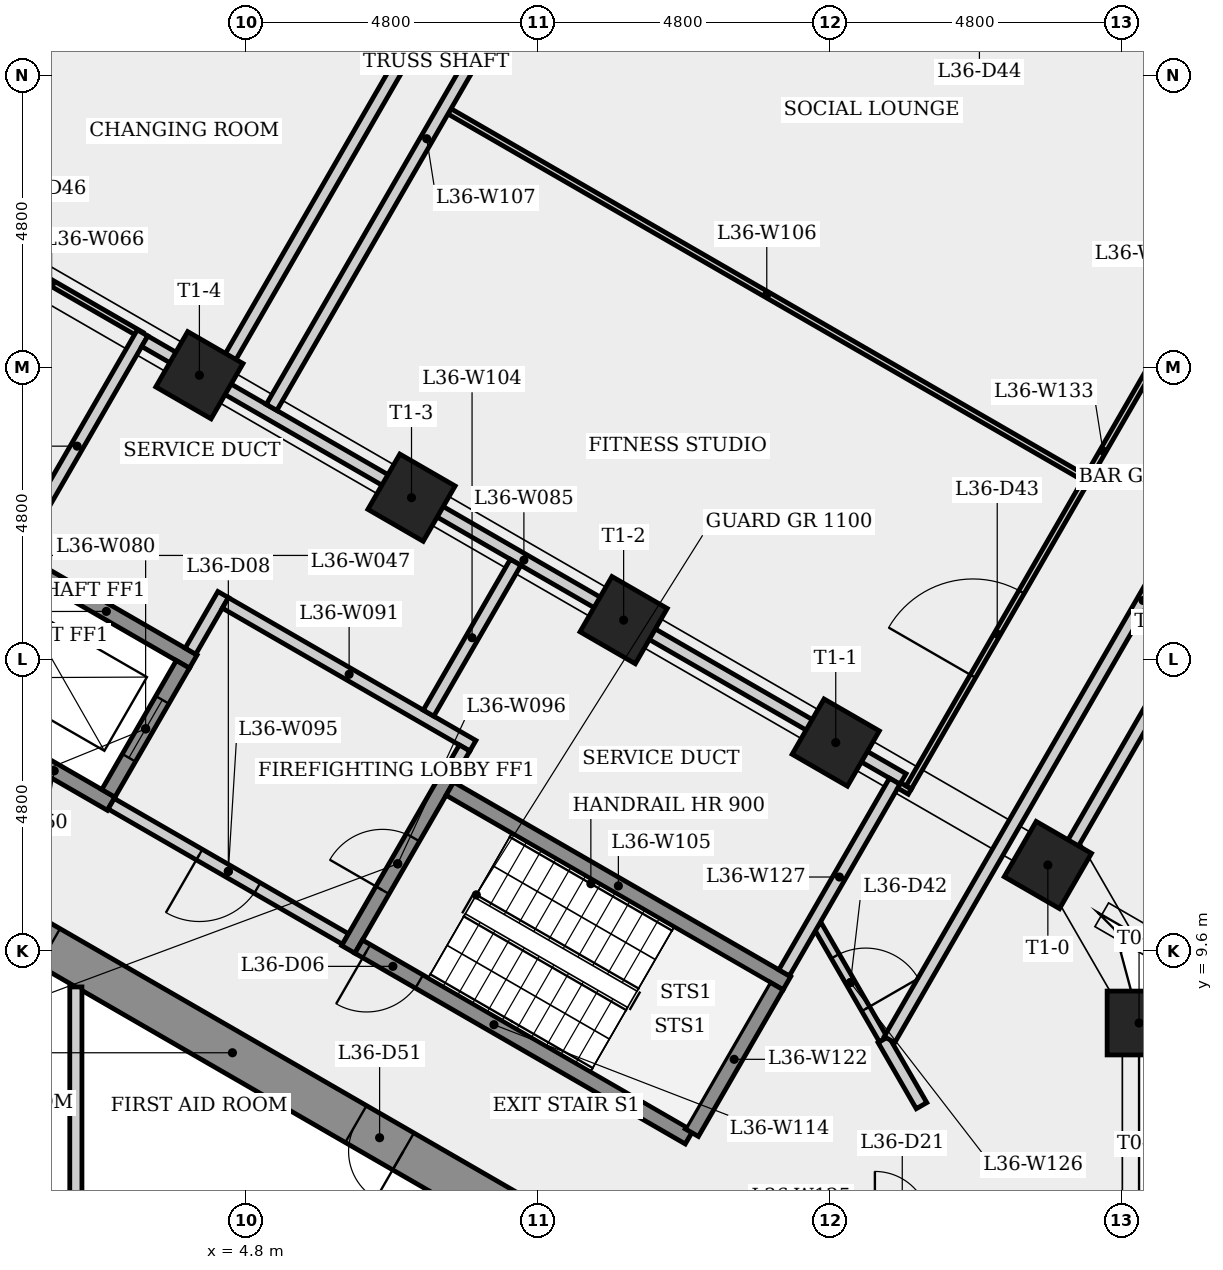
"""IFC4 building model, lengths in metres.
Left out: names, types, materials, properties, quantities, classifications, styles, units other than length and angle.
Written with IfcOpenShell. Run it as: python <this file> out.ifc"""

import sys

from ifc_helpers import new_model, si_unit, direction, frame, frame_2d, origin, origin_2d, place, context, subcontext, project, spatial, rectangle, extrude, element, fill, save


model = new_model("IFC4")
c1 = context("Model", 3, precision=1e-05, world=origin(), true_north=direction((0.0, 1.0)))
c2 = subcontext(c1, "Body", "Model", "MODEL_VIEW")
j1 = project(units=[si_unit("LENGTHUNIT", "METRE"), si_unit("PLANEANGLEUNIT", "RADIAN")], contexts=[c1])
p1 = place(None, origin())
s1 = spatial("IfcSite", under=j1, at=p1, CompositionType="ELEMENT")
p2 = place(p1, origin())
s2 = spatial("IfcBuilding", under=s1, at=p2, CompositionType="ELEMENT")
p3 = place(p2, frame((0.0, 0.0, 135.9)))
s3 = spatial("IfcBuildingStorey", under=s2, at=p3, CompositionType="ELEMENT", Elevation=135.9)
p4 = place(p3, frame((9.325, 5.182, 0.0), z_axis=(0.0, 0.0, 1.0), x_axis=(-0.866023993627, 0.500002442456, 0.0)))
e1 = element("IfcWall", 1, at=p4, inside=s3, PredefinedType="SHEAR", context=c2, shape_type="SweptSolid", body=[
    extrude(rectangle(XDim=10.97, YDim=0.7, at=frame_2d((5.485, 0.0))), origin(), (0.0, 0.0, 1.0), 4.0),
])
p5 = place(p4, frame((8.96, 0.0, 0.0)))
e2 = element("IfcOpeningElement", 2, at=p5, cuts=e1, PredefinedType="OPENING", context=c2, shape_type="SweptSolid", body=[
    extrude(rectangle(XDim=0.9, YDim=2.1, at=frame_2d((0.45, 1.05))), frame((0.0, 0.36, 0.0), z_axis=(0.0, -1.0, 0.0), x_axis=(1.0, 0.0, 0.0)), (0.0, 0.0, 1.0), 0.72),
])
p6 = place(p4, frame((2.24, 0.0, 0.0)))
e3 = element("IfcOpeningElement", 3, at=p6, cuts=e1, PredefinedType="OPENING", context=c2, shape_type="SweptSolid", body=[
    extrude(rectangle(XDim=0.9, YDim=2.1, at=frame_2d((0.45, 1.05))), frame((0.0, 0.36, 0.0), z_axis=(0.0, -1.0, 0.0), x_axis=(1.0, 0.0, 0.0)), (0.0, 0.0, 1.0), 0.72),
])
for number, where, z_axis, x_axis in (
    (4, (19.486, 8.413, 0.0), (0.0, 0.0, 1.0), (1.0, 0.0, 0.0)),
    (5, (17.986, 11.011, 0.0), (0.0, 0.0, 1.0), (0.5, 0.866, 0.0)),
    (6, (14.497, 13.026, 0.0), (0.0, 0.0, 1.0), (0.5, 0.866, 0.0)),
    (7, (11.009, 15.04, 0.0), (0.0, 0.0, 1.0), (0.5, 0.866, 0.0)),
    (8, (7.52, 17.054, 0.0), (0.0, 0.0, 1.0), (0.5, 0.866, 0.0)),
    (9, (4.032, 19.068, 0.0), (0.0, 0.0, 1.0), (0.5, 0.866, 0.0)),
):
    element("IfcColumn", number, at=place(p3, frame(where, z_axis=z_axis, x_axis=x_axis)), inside=s3, PredefinedType="COLUMN", context=c2, shape_type="SweptSolid", body=[
        extrude(rectangle(XDim=1.05, YDim=1.05, at=origin_2d()), origin(), (0.0, 0.0, 1.0), 4.0),
    ])
p7 = place(p3, frame((-2.642, 21.926, 0.0), z_axis=(0.0, 0.0, 1.0), x_axis=(0.391327561496, 0.920251454557, 0.0)))
e10 = element("IfcWall", 10, at=p7, inside=s3, PredefinedType="PLUMBINGWALL", context=c2, shape_type="SweptSolid", body=[
    extrude(rectangle(XDim=13.856, YDim=0.2, at=frame_2d((6.928, 0.0))), origin(), (0.0, 0.0, 1.0), 3.6),
])
p8 = place(p3, frame((0.124, 21.436, 0.0), z_axis=(0.0, 0.0, 1.0), x_axis=(0.866036589769, -0.499980624807, 0.0)))
e11 = element("IfcWall", 11, at=p8, inside=s3, PredefinedType="PARTITIONING", context=c2, shape_type="SweptSolid", body=[
    extrude(rectangle(XDim=3.411, YDim=0.1, at=frame_2d((1.706, 0.0))), origin(), (0.0, 0.0, 1.0), 2.725),
])
p9 = place(p3, frame((1.073, 16.008, 0.0), z_axis=(0.0, 0.0, 1.0), x_axis=(0.866040211805, -0.499974350878, 0.0)))
e12 = element("IfcWall", 12, at=p9, inside=s3, PredefinedType="SHEAR", context=c2, shape_type="SweptSolid", body=[
    extrude(rectangle(XDim=3.3, YDim=0.25, at=frame_2d((1.65, 0.0))), origin(), (0.0, 0.0, 1.0), 3.6),
])
p10 = place(p3, frame((0.946, 16.039, 0.0), z_axis=(0.0, 0.0, 1.0), x_axis=(0.50004020135, 0.86600219228, 0.0)))
e13 = element("IfcWall", 13, at=p10, inside=s3, PredefinedType="PLUMBINGWALL", context=c2, shape_type="SweptSolid", body=[
    extrude(rectangle(XDim=4.301, YDim=0.2, at=frame_2d((2.15, 0.0))), origin(), (0.0, 0.0, 1.0), 3.6),
])
p11 = place(p3, frame((2.0, 9.007, 0.0), z_axis=(0.0, 0.0, 1.0), x_axis=(0.0, -1.0, 0.0)))
e14 = element("IfcWall", 14, at=p11, inside=s3, PredefinedType="PARTITIONING", context=c2, shape_type="SweptSolid", body=[
    extrude(rectangle(XDim=3.732, YDim=0.2, at=frame_2d((1.866, 0.0))), origin(), (0.0, 0.0, 1.0), 3.6),
])
p12 = place(p3, frame((2.581, 12.02, 0.0), z_axis=(0.0, 0.0, 1.0), x_axis=(-0.86603892542, 0.499976579108, 0.0)))
e15 = element("IfcWall", 15, at=p12, inside=s3, PredefinedType="SHEAR", context=c2, shape_type="SweptSolid", body=[
    extrude(rectangle(XDim=2.162, YDim=0.25, at=frame_2d((1.081, 0.0))), origin(), (0.0, 0.0, 1.0), 3.6),
])
p13 = place(p3, frame((2.535, 12.191, 0.0), z_axis=(0.0, 0.0, 1.0), x_axis=(0.500061746146, 0.865989751695, 0.0)))
e16 = element("IfcWall", 16, at=p13, inside=s3, PredefinedType="SHEAR", context=c2, shape_type="SweptSolid", body=[
    extrude(rectangle(XDim=2.45, YDim=0.25, at=frame_2d((1.225, 0.0))), origin(), (0.0, 0.0, 1.0), 4.0),
])
p14 = place(p13, frame((0.675, 0.0, 0.0)))
e17 = element("IfcOpeningElement", 17, at=p14, cuts=e16, PredefinedType="OPENING", context=c2, shape_type="SweptSolid", body=[
    extrude(rectangle(XDim=1.1, YDim=2.1, at=frame_2d((0.55, 1.05))), frame((0.0, 0.135, 0.0), z_axis=(0.0, -1.0, 0.0), x_axis=(1.0, 0.0, 0.0)), (0.0, 0.0, 1.0), 0.27),
])
p15 = place(p3, frame((0.187, 21.457, 0.0), z_axis=(0.0, 0.0, 1.0), x_axis=(0.391326404729, 0.920251946459, 0.0)))
e18 = element("IfcWall", 18, at=p15, inside=s3, PredefinedType="PARTITIONING", context=c2, shape_type="SweptSolid", body=[
    extrude(rectangle(XDim=12.69, YDim=0.1, at=frame_2d((6.345, 0.0))), origin(), (0.0, 0.0, 1.0), 3.6),
])
p16 = place(p15, frame((2.857, 0.0, 0.0)))
e19 = element("IfcOpeningElement", 19, at=p16, cuts=e18, PredefinedType="OPENING", context=c2, shape_type="SweptSolid", body=[
    extrude(rectangle(XDim=0.9, YDim=2.1, at=frame_2d((0.45, 1.05))), frame((0.0, 0.06, 0.0), z_axis=(0.0, -1.0, 0.0), x_axis=(1.0, 0.0, 0.0)), (0.0, 0.0, 1.0), 0.12),
])
p17 = place(p3, frame((3.133, 19.627, 0.0), z_axis=(0.0, 0.0, 1.0), x_axis=(0.866025783705, -0.499999341958, 0.0)))
e20 = element("IfcWall", 20, at=p17, inside=s3, PredefinedType="PLUMBINGWALL", context=c2, shape_type="SweptSolid", body=[
    extrude(rectangle(XDim=14.4, YDim=0.2, at=frame_2d((7.2, 0.0))), origin(), (0.0, 0.0, 1.0), 2.725),
])
p18 = place(p3, frame((3.574, 33.989, 0.0), z_axis=(0.0, 0.0, 1.0), x_axis=(-0.391321327566, -0.920254105447, 0.0)))
e21 = element("IfcWall", 21, at=p18, inside=s3, PredefinedType="PLUMBINGWALL", context=c2, shape_type="SweptSolid", body=[
    extrude(rectangle(XDim=12.903, YDim=0.2, at=frame_2d((6.452, 0.0))), origin(), (0.0, 0.0, 1.0), 3.6),
])
p19 = place(p3, frame((3.885, 14.529, 0.0), z_axis=(0.0, 0.0, 1.0), x_axis=(0.499997628298, 0.866026773083, 0.0)))
e22 = element("IfcWall", 22, at=p19, inside=s3, PredefinedType="PLUMBINGWALL", context=c2, shape_type="SweptSolid", body=[
    extrude(rectangle(XDim=1.075, YDim=0.2, at=frame_2d((0.538, 0.0))), origin(), (0.0, 0.0, 1.0), 3.6),
])
p20 = place(p3, frame((4.352, 19.038, 0.0), z_axis=(0.0, 0.0, 1.0), x_axis=(0.500008481224, 0.866020507092, 0.0)))
e23 = element("IfcWall", 23, at=p20, inside=s3, PredefinedType="PLUMBINGWALL", context=c2, shape_type="SweptSolid", body=[
    extrude(rectangle(XDim=12.758, YDim=0.2, at=frame_2d((6.379, 0.0))), origin(), (0.0, 0.0, 1.0), 3.6),
])
p21 = place(p3, frame((4.459, 15.323, 0.0), z_axis=(0.0, 0.0, 1.0), x_axis=(0.866016039709, -0.500016218704, 0.0)))
e24 = element("IfcWall", 24, at=p21, inside=s3, PredefinedType="PLUMBINGWALL", context=c2, shape_type="SweptSolid", body=[
    extrude(rectangle(XDim=4.7, YDim=0.2, at=frame_2d((2.35, 0.0))), origin(), (0.0, 0.0, 1.0), 3.6),
])
p22 = place(p3, frame((6.435, 9.795, 0.0), z_axis=(0.0, 0.0, 1.0), x_axis=(-0.866012907634, 0.500021643343, 0.0)))
e25 = element("IfcWall", 25, at=p22, inside=s3, PredefinedType="PARTITIONING", context=c2, shape_type="SweptSolid", body=[
    extrude(rectangle(XDim=4.45, YDim=0.2, at=frame_2d((2.225, 0.0))), origin(), (0.0, 0.0, 1.0), 3.6),
])
p23 = place(p22, frame((1.675, 0.0, 0.0)))
e26 = element("IfcOpeningElement", 26, at=p23, cuts=e25, PredefinedType="OPENING", context=c2, shape_type="SweptSolid", body=[
    extrude(rectangle(XDim=1.1, YDim=2.1, at=frame_2d((0.55, 1.05))), frame((0.0, 0.11, 0.0), z_axis=(0.0, -1.0, 0.0), x_axis=(1.0, 0.0, 0.0)), (0.0, 0.0, 1.0), 0.22),
])
p24 = place(p3, frame((6.48, 9.624, 0.0), z_axis=(0.0, 0.0, 1.0), x_axis=(0.500017246033, 0.866015446554, 0.0)))
e27 = element("IfcWall", 27, at=p24, inside=s3, PredefinedType="SHEAR", context=c2, shape_type="SweptSolid", body=[
    extrude(rectangle(XDim=3.25, YDim=0.25, at=frame_2d((1.625, 0.0))), origin(), (0.0, 0.0, 1.0), 3.6),
])
p25 = place(p24, frame((1.125, 0.0, 0.0)))
e28 = element("IfcOpeningElement", 28, at=p25, cuts=e27, PredefinedType="OPENING", context=c2, shape_type="SweptSolid", body=[
    extrude(rectangle(XDim=1.0, YDim=2.1, at=frame_2d((0.5, 1.05))), frame((0.0, 0.135, 0.0), z_axis=(0.0, -1.0, 0.0), x_axis=(1.0, 0.0, 0.0)), (0.0, 0.0, 1.0), 0.27),
])
p26 = place(p3, frame((7.8, 13.51, 0.0), z_axis=(0.0, 0.0, 1.0), x_axis=(0.499980730498, 0.866036528751, 0.0)))
e29 = element("IfcWall", 29, at=p26, inside=s3, PredefinedType="PLUMBINGWALL", context=c2, shape_type="SweptSolid", body=[
    extrude(rectangle(XDim=2.864, YDim=0.2, at=frame_2d((1.432, 0.0))), origin(), (0.0, 0.0, 1.0), 3.6),
])
p27 = place(p3, frame((8.151, 12.268, 0.0), z_axis=(0.0, 0.0, 1.0), x_axis=(0.866025499775, -0.499999833739, 0.0)))
e30 = element("IfcWall", 30, at=p27, inside=s3, PredefinedType="SHEAR", context=c2, shape_type="SweptSolid", body=[
    extrude(rectangle(XDim=6.4, YDim=0.25, at=frame_2d((3.2, 0.0))), origin(), (0.0, 0.0, 1.0), 3.6),
])
p28 = place(p3, frame((8.145, 23.408, 0.0), z_axis=(0.0, 0.0, 1.0), x_axis=(0.866032748968, -0.499987277554, 0.0)))
e31 = element("IfcWall", 31, at=p28, inside=s3, PredefinedType="PARTITIONING", context=c2, shape_type="SweptSolid", body=[
    extrude(rectangle(XDim=12.05, YDim=0.1, at=frame_2d((6.025, 0.0))), origin(), (0.0, 0.0, 1.0), 3.6),
])
p29 = place(p3, frame((5.219, 18.538, 0.0), z_axis=(0.0, 0.0, 1.0), x_axis=(0.499994128518, 0.86602879366, 0.0)))
e32 = element("IfcWall", 32, at=p29, inside=s3, PredefinedType="PLUMBINGWALL", context=c2, shape_type="SweptSolid", body=[
    extrude(rectangle(XDim=12.758, YDim=0.2, at=frame_2d((6.379, 0.0))), origin(), (0.0, 0.0, 1.0), 3.6),
])
p30 = place(p3, frame((8.393, 12.937, 0.0), z_axis=(0.0, 0.0, 1.0), x_axis=(-0.500065409566, -0.86598763626, 0.0)))
e33 = element("IfcWall", 33, at=p30, inside=s3, PredefinedType="PLUMBINGWALL", context=c2, shape_type="SweptSolid", body=[
    extrude(rectangle(XDim=0.575, YDim=0.2, at=frame_2d((0.288, 0.0))), origin(), (0.0, 0.0, 1.0), 3.6),
])
p31 = place(p3, frame((11.1, 7.101, 0.0), z_axis=(0.0, 0.0, 1.0), x_axis=(-0.8660265141, 0.499998076872, 0.0)))
e34 = element("IfcWall", 34, at=p31, inside=s3, PredefinedType="SHEAR", context=c2, shape_type="SweptSolid", body=[
    extrude(rectangle(XDim=5.137, YDim=0.25, at=frame_2d((2.569, 0.0))), origin(), (0.0, 0.0, 1.0), 3.6),
])
p32 = place(p31, frame((3.987, 0.0, 0.0)))
e35 = element("IfcOpeningElement", 35, at=p32, cuts=e34, PredefinedType="OPENING", context=c2, shape_type="SweptSolid", body=[
    extrude(rectangle(XDim=1.0, YDim=2.1, at=frame_2d((0.5, 1.05))), frame((0.0, 0.135, 0.0), z_axis=(0.0, -1.0, 0.0), x_axis=(1.0, 0.0, 0.0)), (0.0, 0.0, 1.0), 0.27),
])
p33 = place(p3, frame((12.085, 6.532, 0.0), z_axis=(0.0, 0.0, 1.0), x_axis=(-0.86604373436, 0.499968249168, 0.0)))
e36 = element("IfcWall", 36, at=p33, inside=s3, PredefinedType="SHEAR", context=c2, shape_type="SweptSolid", body=[
    extrude(rectangle(XDim=1.118, YDim=0.25, at=frame_2d((0.559, 0.0))), origin(), (0.0, 0.0, 1.0), 3.6),
])
p34 = place(p3, frame((13.523, 9.022, 0.0), z_axis=(0.0, 0.0, 1.0), x_axis=(-0.500013277472, -0.866017737897, 0.0)))
e37 = element("IfcWall", 37, at=p34, inside=s3, PredefinedType="SHEAR", context=c2, shape_type="SweptSolid", body=[
    extrude(rectangle(XDim=2.786, YDim=0.25, at=frame_2d((1.393, 0.0))), origin(), (0.0, 0.0, 1.0), 3.6),
])
p35 = place(p3, frame((14.197, 10.017, 0.0), z_axis=(0.0, 0.0, 1.0), x_axis=(0.500076756895, -0.865981083635, 0.0)))
e38 = element("IfcWall", 38, at=p35, inside=s3, PredefinedType="PARTITIONING", context=c2, shape_type="SweptSolid", body=[
    extrude(rectangle(XDim=2.167, YDim=0.15, at=frame_2d((1.083, 0.0))), origin(), (0.0, 0.0, 1.0), 3.6),
])
p36 = place(p35, frame((0.583, 0.0, 0.0)))
e39 = element("IfcOpeningElement", 39, at=p36, cuts=e38, PredefinedType="OPENING", context=c2, shape_type="SweptSolid", body=[
    extrude(rectangle(XDim=1.0, YDim=2.1, at=frame_2d((0.5, 1.05))), frame((0.0, 0.085, 0.0), z_axis=(0.0, -1.0, 0.0), x_axis=(1.0, 0.0, 0.0)), (0.0, 0.0, 1.0), 0.17),
])
p37 = place(p3, frame((13.648, 9.239, 0.0), z_axis=(0.0, 0.0, 1.0), x_axis=(0.499977996243, 0.866038107287, 0.0)))
e40 = element("IfcWall", 40, at=p37, inside=s3, PredefinedType="PLUMBINGWALL", context=c2, shape_type="SweptSolid", body=[
    extrude(rectangle(XDim=3.639, YDim=0.2, at=frame_2d((1.819, 0.0))), origin(), (0.0, 0.0, 1.0), 3.6),
])
p38 = place(p3, frame((15.281, 8.14, 0.0), z_axis=(0.0, 0.0, 1.0), x_axis=(0.500031220278, -0.866007377998, 0.0)))
e41 = element("IfcWall", 41, at=p38, inside=s3, PredefinedType="PLUMBINGWALL", context=c2, shape_type="SweptSolid", body=[
    extrude(rectangle(XDim=1.255, YDim=0.2, at=frame_2d((0.627, 0.0))), origin(), (0.0, 0.0, 1.0), 3.6),
])
p39 = place(p3, frame((15.381, 8.14, 0.0), z_axis=(0.0, 0.0, 1.0), x_axis=(0.500000327893, 0.866025214475, 0.0)))
e42 = element("IfcWall", 42, at=p39, inside=s3, PredefinedType="PLUMBINGWALL", context=c2, shape_type="SweptSolid", body=[
    extrude(rectangle(XDim=16.681, YDim=0.2, at=frame_2d((8.341, 0.0))), origin(), (0.0, 0.0, 1.0), 3.6),
])
p40 = place(p3, frame((15.542, 12.32, 0.0), z_axis=(0.0, 0.0, 1.0), x_axis=(0.866510491504, -0.499158860599, 0.0)))
e43 = element("IfcWall", 43, at=p40, inside=s3, PredefinedType="PARTITIONING", context=c2, shape_type="SweptSolid", body=[
    extrude(rectangle(XDim=0.2, YDim=0.1, at=frame_2d((0.1, 0.0))), origin(), (0.0, 0.0, 1.0), 3.6),
])
p41 = place(p3, frame((15.697, 12.288, 0.0), z_axis=(0.0, 0.0, 1.0), x_axis=(0.500009610757, 0.86601985494, 0.0)))
e44 = element("IfcWall", 44, at=p41, inside=s3, PredefinedType="PARTITIONING", context=c2, shape_type="SweptSolid", body=[
    extrude(rectangle(XDim=12.781, YDim=0.1, at=frame_2d((6.391, 0.0))), origin(), (0.0, 0.0, 1.0), 3.6),
])
p42 = place(p41, frame((2.112, 0.0, 0.0)))
e45 = element("IfcOpeningElement", 45, at=p42, cuts=e44, PredefinedType="OPENING", context=c2, shape_type="SweptSolid", body=[
    extrude(rectangle(XDim=1.6, YDim=2.1, at=frame_2d((0.8, 1.05))), frame((0.0, 0.06, 0.0), z_axis=(0.0, -1.0, 0.0), x_axis=(1.0, 0.0, 0.0)), (0.0, 0.0, 1.0), 0.12),
])
p43 = place(p3, frame((11.634, 29.45, 0.0), z_axis=(0.0, 0.0, 1.0), x_axis=(0.866025616189, -0.499999632104, 0.0)))
e46 = element("IfcWall", 46, at=p43, inside=s3, PredefinedType="PARTITIONING", context=c2, shape_type="SweptSolid", body=[
    extrude(rectangle(XDim=13.8, YDim=0.1, at=frame_2d((6.9, 0.0))), origin(), (0.0, 0.0, 1.0), 3.6),
])
p44 = place(p43, frame((5.235, 0.0, 0.0)))
e47 = element("IfcOpeningElement", 47, at=p44, cuts=e46, PredefinedType="OPENING", context=c2, shape_type="SweptSolid", body=[
    extrude(rectangle(XDim=1.6, YDim=2.1, at=frame_2d((0.8, 1.05))), frame((0.0, 0.06, 0.0), z_axis=(0.0, -1.0, 0.0), x_axis=(1.0, 0.0, 0.0)), (0.0, 0.0, 1.0), 0.12),
])
p45 = place(p3, frame((24.488, 21.914, 0.0), z_axis=(0.0, 0.0, 1.0), x_axis=(-0.50000571756, -0.866022102725, 0.0)))
e48 = element("IfcWall", 48, at=p45, inside=s3, PredefinedType="PLUMBINGWALL", context=c2, shape_type="SweptSolid", body=[
    extrude(rectangle(XDim=12.807, YDim=0.2, at=frame_2d((6.404, 0.0))), origin(), (0.0, 0.0, 1.0), 3.6),
])
p46 = place(p32, origin())
e49 = element("IfcDoor", 49, at=p46, inside=s3, OperationType="SINGLE_SWING_RIGHT", PredefinedType="DOOR", context=c2, shape_type="SweptSolid", body=[
    extrude(rectangle(XDim=1.0, YDim=2.1, at=frame_2d((0.5, 1.05))), frame((0.0, 0.025, 0.0), z_axis=(0.0, -1.0, 0.0), x_axis=(1.0, 0.0, 0.0)), (0.0, 0.0, 1.0), 0.05),
])
fill(e35, e49)
p47 = place(p25, origin())
e50 = element("IfcDoor", 50, at=p47, inside=s3, OperationType="SINGLE_SWING_LEFT", PredefinedType="DOOR", context=c2, shape_type="SweptSolid", body=[
    extrude(rectangle(XDim=1.0, YDim=2.1, at=frame_2d((0.5, 1.05))), frame((0.0, 0.025, 0.0), z_axis=(0.0, -1.0, 0.0), x_axis=(1.0, 0.0, 0.0)), (0.0, 0.0, 1.0), 0.05),
])
fill(e28, e50)
p48 = place(p23, origin())
e51 = element("IfcDoor", 51, at=p48, inside=s3, OperationType="SINGLE_SWING_RIGHT", PredefinedType="DOOR", context=c2, shape_type="SweptSolid", body=[
    extrude(rectangle(XDim=1.1, YDim=2.1, at=frame_2d((0.55, 1.05))), frame((0.0, 0.025, 0.0), z_axis=(0.0, -1.0, 0.0), x_axis=(1.0, 0.0, 0.0)), (0.0, 0.0, 1.0), 0.05),
])
fill(e26, e51)
p49 = place(p14, origin())
e52 = element("IfcDoor", 52, at=p49, inside=s3, OperationType="SLIDING_TO_LEFT", PredefinedType="DOOR", context=c2, shape_type="SweptSolid", body=[
    extrude(rectangle(XDim=1.1, YDim=2.1, at=frame_2d((0.55, 1.05))), frame((0.0, 0.025, 0.0), z_axis=(0.0, -1.0, 0.0), x_axis=(1.0, 0.0, 0.0)), (0.0, 0.0, 1.0), 0.05),
])
fill(e17, e52)
p50 = place(p36, origin())
e53 = element("IfcDoor", 53, at=p50, inside=s3, OperationType="SINGLE_SWING_RIGHT", PredefinedType="DOOR", context=c2, shape_type="SweptSolid", body=[
    extrude(rectangle(XDim=1.0, YDim=2.1, at=frame_2d((0.5, 1.05))), frame((0.0, 0.025, 0.0), z_axis=(0.0, -1.0, 0.0), x_axis=(1.0, 0.0, 0.0)), (0.0, 0.0, 1.0), 0.05),
])
fill(e39, e53)
p51 = place(p42, origin())
e54 = element("IfcDoor", 54, at=p51, inside=s3, OperationType="SINGLE_SWING_LEFT", PredefinedType="DOOR", context=c2, shape_type="SweptSolid", body=[
    extrude(rectangle(XDim=1.6, YDim=2.1, at=frame_2d((0.8, 1.05))), frame((0.0, 0.025, 0.0), z_axis=(0.0, -1.0, 0.0), x_axis=(1.0, 0.0, 0.0)), (0.0, 0.0, 1.0), 0.05),
])
fill(e45, e54)
p52 = place(p16, origin())
e55 = element("IfcDoor", 55, at=p52, inside=s3, OperationType="SINGLE_SWING_RIGHT", PredefinedType="DOOR", context=c2, shape_type="SweptSolid", body=[
    extrude(rectangle(XDim=0.9, YDim=2.1, at=frame_2d((0.45, 1.05))), frame((0.0, 0.025, 0.0), z_axis=(0.0, -1.0, 0.0), x_axis=(1.0, 0.0, 0.0)), (0.0, 0.0, 1.0), 0.05),
])
fill(e19, e55)
p53 = place(p6, origin())
e56 = element("IfcDoor", 56, at=p53, inside=s3, OperationType="SINGLE_SWING_LEFT", PredefinedType="DOOR", context=c2, shape_type="SweptSolid", body=[
    extrude(rectangle(XDim=0.9, YDim=2.1, at=frame_2d((0.45, 1.05))), frame((0.0, 0.025, 0.0), z_axis=(0.0, -1.0, 0.0), x_axis=(1.0, 0.0, 0.0)), (0.0, 0.0, 1.0), 0.05),
])
fill(e3, e56)
save(model, sys.argv[1])
